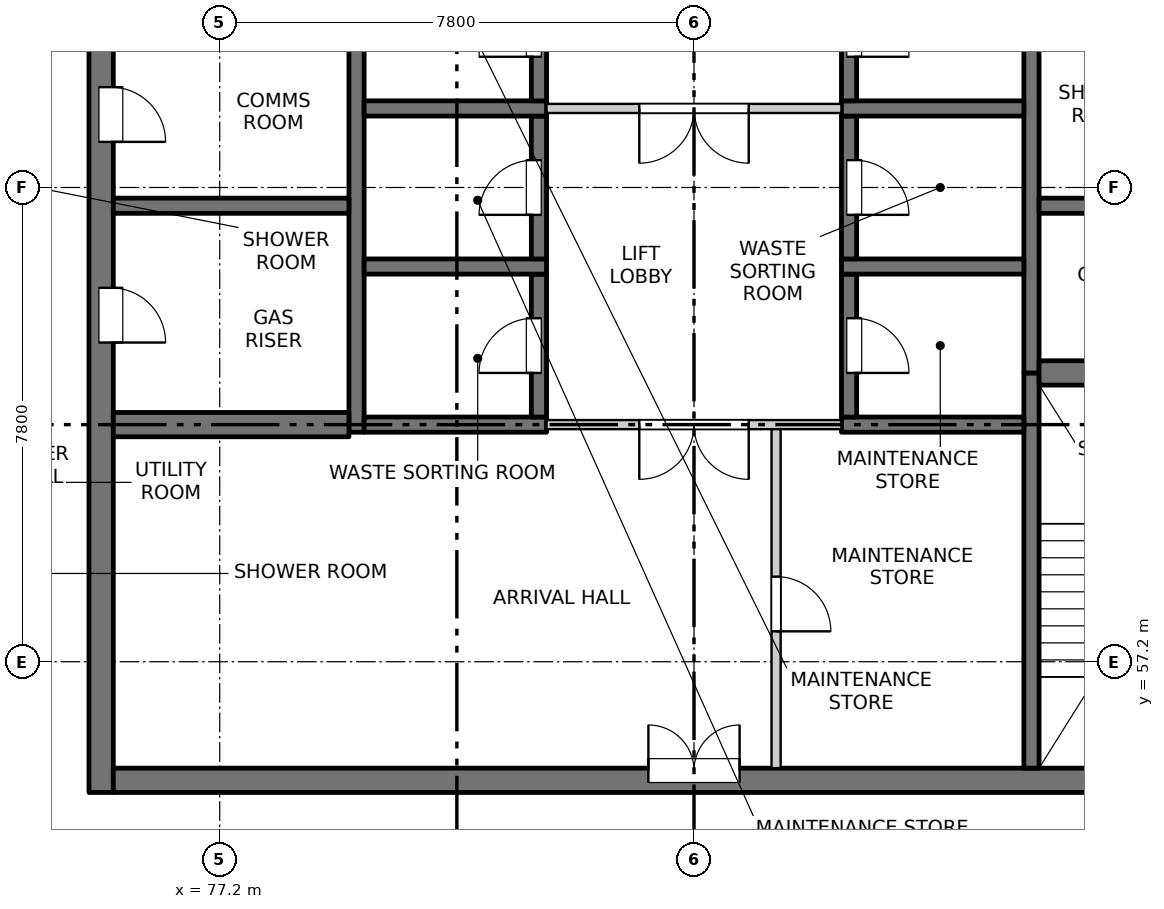
"""IFC4 building model, lengths in metres.
Left out: names, types, materials, properties, quantities, classifications, styles, units other than length and angle.
Written with IfcOpenShell. Run it as: python <this file> out.ifc"""

import sys

from ifc_helpers import new_model, si_unit, direction, frame, frame_2d, origin, place, context, subcontext, project, spatial, rectangle, extrude, element, fill, save


model = new_model("IFC4")
c1 = context("Model", 3, precision=1e-05, world=origin(), true_north=direction((0.0, 1.0)))
c2 = subcontext(c1, "Body", "Model", "MODEL_VIEW")
j1 = project(units=[si_unit("LENGTHUNIT", "METRE"), si_unit("PLANEANGLEUNIT", "RADIAN")], contexts=[c1])
p1 = place(None, origin())
s1 = spatial("IfcSite", under=j1, at=p1, CompositionType="ELEMENT")
p2 = place(p1, origin())
s2 = spatial("IfcBuilding", under=s1, at=p2, CompositionType="ELEMENT")
p3 = place(p2, frame((0.0, 0.0, 224.5)))
s3 = spatial("IfcBuildingStorey", under=s2, at=p3, CompositionType="ELEMENT", Elevation=224.5)
p4 = place(p3, frame((75.25, 55.05, -0.25), z_axis=(0.0, 0.0, 1.0), x_axis=(0.0, 1.0, 0.0)))
e1 = element("IfcWall", 1, at=p4, inside=s3, PredefinedType="SOLIDWALL", context=c2, shape_type="SweptSolid", body=[
    extrude(rectangle(XDim=22.25, YDim=0.4, at=frame_2d((11.125, 0.0))), origin(), (0.0, 0.0, 1.0), 3.4),
])
p5 = place(p4, frame((7.4, 0.0, 0.25)))
e2 = element("IfcOpeningElement", 2, at=p5, cuts=e1, PredefinedType="OPENING", context=c2, shape_type="SweptSolid", body=[
    extrude(rectangle(XDim=0.9, YDim=2.1, at=frame_2d((0.45, 1.05))), frame((0.0, 0.21, 0.0), z_axis=(0.0, -1.0, 0.0), x_axis=(1.0, 0.0, 0.0)), (0.0, 0.0, 1.0), 0.42),
])
p6 = place(p4, frame((10.7, 0.0, 0.25)))
e3 = element("IfcOpeningElement", 3, at=p6, cuts=e1, PredefinedType="OPENING", context=c2, shape_type="SweptSolid", body=[
    extrude(rectangle(XDim=0.9, YDim=2.1, at=frame_2d((0.45, 1.05))), frame((0.0, 0.21, 0.0), z_axis=(0.0, -1.0, 0.0), x_axis=(1.0, 0.0, 0.0)), (0.0, 0.0, 1.0), 0.42),
])
p7 = place(p4, frame((15.2, 0.0, 0.25)))
e4 = element("IfcOpeningElement", 4, at=p7, cuts=e1, PredefinedType="OPENING", context=c2, shape_type="SweptSolid", body=[
    extrude(rectangle(XDim=0.9, YDim=2.1, at=frame_2d((0.45, 1.05))), frame((0.0, 0.21, 0.0), z_axis=(0.0, -1.0, 0.0), x_axis=(1.0, 0.0, 0.0)), (0.0, 0.0, 1.0), 0.42),
])
p8 = place(p4, frame((20.0, 0.0, 0.25)))
e5 = element("IfcOpeningElement", 5, at=p8, cuts=e1, PredefinedType="OPENING", context=c2, shape_type="SweptSolid", body=[
    extrude(rectangle(XDim=0.9, YDim=2.1, at=frame_2d((0.45, 1.05))), frame((0.0, 0.21, 0.0), z_axis=(0.0, -1.0, 0.0), x_axis=(1.0, 0.0, 0.0)), (0.0, 0.0, 1.0), 0.42),
])
p9 = place(p3, frame((75.45, 55.25, -0.25), z_axis=(0.0, 0.0, 1.0), x_axis=(1.0, 0.0, 0.0)))
e6 = element("IfcWall", 6, at=p9, inside=s3, PredefinedType="SOLIDWALL", context=c2, shape_type="SweptSolid", body=[
    extrude(rectangle(XDim=19.1, YDim=0.4, at=frame_2d((9.55, 0.0))), origin(), (0.0, 0.0, 1.0), 3.4),
])
p10 = place(p9, frame((8.8, 0.0, 0.25)))
e7 = element("IfcOpeningElement", 7, at=p10, cuts=e6, PredefinedType="OPENING", context=c2, shape_type="SweptSolid", body=[
    extrude(rectangle(XDim=1.5, YDim=2.1, at=frame_2d((0.75, 1.05))), frame((0.0, 0.21, 0.0), z_axis=(0.0, -1.0, 0.0), x_axis=(1.0, 0.0, 0.0)), (0.0, 0.0, 1.0), 0.42),
])
p11 = place(p3, frame((79.45, 60.975, -0.25), z_axis=(0.0, 0.0, 1.0), x_axis=(0.0, 1.0, 0.0)))
e8 = element("IfcWall", 8, at=p11, inside=s3, PredefinedType="SOLIDWALL", context=c2, shape_type="SweptSolid", body=[
    extrude(rectangle(XDim=16.325, YDim=0.25, at=frame_2d((8.163, 0.0))), origin(), (0.0, 0.0, 1.0), 3.4),
])
p12 = place(p3, frame((90.55, 55.45, -0.25), z_axis=(0.0, 0.0, 1.0), x_axis=(0.0, 1.0, 0.0)))
e9 = element("IfcWall", 9, at=p12, inside=s3, PredefinedType="SOLIDWALL", context=c2, shape_type="SweptSolid", body=[
    extrude(rectangle(XDim=6.5, YDim=0.25, at=frame_2d((3.25, 0.0))), origin(), (0.0, 0.0, 1.0), 3.4),
])
p13 = place(p3, frame((90.55, 61.95, -0.25), z_axis=(0.0, 0.0, 1.0), x_axis=(0.0, 1.0, 0.0)))
e10 = element("IfcWall", 10, at=p13, inside=s3, PredefinedType="SOLIDWALL", context=c2, shape_type="SweptSolid", body=[
    extrude(rectangle(XDim=15.35, YDim=0.25, at=frame_2d((7.675, 0.0))), origin(), (0.0, 0.0, 1.0), 3.4),
])
p14 = place(p3, frame((79.575, 61.1, -0.25), z_axis=(0.0, 0.0, 1.0), x_axis=(1.0, 0.0, 0.0)))
e11 = element("IfcWall", 11, at=p14, inside=s3, PredefinedType="SOLIDWALL", context=c2, shape_type="SweptSolid", body=[
    extrude(rectangle(XDim=3.0, YDim=0.25, at=frame_2d((1.5, 0.0))), origin(), (0.0, 0.0, 1.0), 3.4),
])
p15 = place(p3, frame((82.45, 61.225, -0.25), z_axis=(0.0, 0.0, 1.0), x_axis=(0.0, 1.0, 0.0)))
e12 = element("IfcWall", 12, at=p15, inside=s3, PredefinedType="SOLIDWALL", context=c2, shape_type="SweptSolid", body=[
    extrude(rectangle(XDim=2.35, YDim=0.25, at=frame_2d((1.175, 0.0))), origin(), (0.0, 0.0, 1.0), 3.4),
])
p16 = place(p15, frame((0.725, 0.0, 0.25)))
e13 = element("IfcOpeningElement", 13, at=p16, cuts=e12, PredefinedType="OPENING", context=c2, shape_type="SweptSolid", body=[
    extrude(rectangle(XDim=0.9, YDim=2.1, at=frame_2d((0.45, 1.05))), frame((0.0, 0.135, 0.0), z_axis=(0.0, -1.0, 0.0), x_axis=(1.0, 0.0, 0.0)), (0.0, 0.0, 1.0), 0.27),
])
p17 = place(p3, frame((79.575, 63.7, -0.25), z_axis=(0.0, 0.0, 1.0), x_axis=(1.0, 0.0, 0.0)))
e14 = element("IfcWall", 14, at=p17, inside=s3, PredefinedType="SOLIDWALL", context=c2, shape_type="SweptSolid", body=[
    extrude(rectangle(XDim=3.0, YDim=0.25, at=frame_2d((1.5, 0.0))), origin(), (0.0, 0.0, 1.0), 3.4),
])
p18 = place(p3, frame((82.45, 63.825, -0.25), z_axis=(0.0, 0.0, 1.0), x_axis=(0.0, 1.0, 0.0)))
e15 = element("IfcWall", 15, at=p18, inside=s3, PredefinedType="SOLIDWALL", context=c2, shape_type="SweptSolid", body=[
    extrude(rectangle(XDim=2.35, YDim=0.25, at=frame_2d((1.175, 0.0))), origin(), (0.0, 0.0, 1.0), 3.4),
])
p19 = place(p18, frame((0.725, 0.0, 0.25)))
e16 = element("IfcOpeningElement", 16, at=p19, cuts=e15, PredefinedType="OPENING", context=c2, shape_type="SweptSolid", body=[
    extrude(rectangle(XDim=0.9, YDim=2.1, at=frame_2d((0.45, 1.05))), frame((0.0, 0.135, 0.0), z_axis=(0.0, -1.0, 0.0), x_axis=(1.0, 0.0, 0.0)), (0.0, 0.0, 1.0), 0.27),
])
p20 = place(p3, frame((79.575, 66.3, -0.25), z_axis=(0.0, 0.0, 1.0), x_axis=(1.0, 0.0, 0.0)))
e17 = element("IfcWall", 17, at=p20, inside=s3, PredefinedType="SOLIDWALL", context=c2, shape_type="SweptSolid", body=[
    extrude(rectangle(XDim=3.0, YDim=0.25, at=frame_2d((1.5, 0.0))), origin(), (0.0, 0.0, 1.0), 3.4),
])
p21 = place(p3, frame((82.45, 66.425, -0.25), z_axis=(0.0, 0.0, 1.0), x_axis=(0.0, 1.0, 0.0)))
e18 = element("IfcWall", 18, at=p21, inside=s3, PredefinedType="SOLIDWALL", context=c2, shape_type="SweptSolid", body=[
    extrude(rectangle(XDim=2.35, YDim=0.25, at=frame_2d((1.175, 0.0))), origin(), (0.0, 0.0, 1.0), 3.4),
])
p22 = place(p21, frame((0.725, 0.0, 0.25)))
e19 = element("IfcOpeningElement", 19, at=p22, cuts=e18, PredefinedType="OPENING", context=c2, shape_type="SweptSolid", body=[
    extrude(rectangle(XDim=0.9, YDim=2.1, at=frame_2d((0.45, 1.05))), frame((0.0, 0.135, 0.0), z_axis=(0.0, -1.0, 0.0), x_axis=(1.0, 0.0, 0.0)), (0.0, 0.0, 1.0), 0.27),
])
p23 = place(p3, frame((87.425, 61.1, -0.25), z_axis=(0.0, 0.0, 1.0), x_axis=(1.0, 0.0, 0.0)))
e20 = element("IfcWall", 20, at=p23, inside=s3, PredefinedType="SOLIDWALL", context=c2, shape_type="SweptSolid", body=[
    extrude(rectangle(XDim=3.0, YDim=0.25, at=frame_2d((1.5, 0.0))), origin(), (0.0, 0.0, 1.0), 3.4),
])
p24 = place(p3, frame((87.55, 61.225, -0.25), z_axis=(0.0, 0.0, 1.0), x_axis=(0.0, 1.0, 0.0)))
e21 = element("IfcWall", 21, at=p24, inside=s3, PredefinedType="SOLIDWALL", context=c2, shape_type="SweptSolid", body=[
    extrude(rectangle(XDim=2.35, YDim=0.25, at=frame_2d((1.175, 0.0))), origin(), (0.0, 0.0, 1.0), 3.4),
])
p25 = place(p24, frame((0.725, 0.0, 0.25)))
e22 = element("IfcOpeningElement", 22, at=p25, cuts=e21, PredefinedType="OPENING", context=c2, shape_type="SweptSolid", body=[
    extrude(rectangle(XDim=0.9, YDim=2.1, at=frame_2d((0.45, 1.05))), frame((0.0, 0.135, 0.0), z_axis=(0.0, -1.0, 0.0), x_axis=(1.0, 0.0, 0.0)), (0.0, 0.0, 1.0), 0.27),
])
p26 = place(p3, frame((87.425, 63.7, -0.25), z_axis=(0.0, 0.0, 1.0), x_axis=(1.0, 0.0, 0.0)))
e23 = element("IfcWall", 23, at=p26, inside=s3, PredefinedType="SOLIDWALL", context=c2, shape_type="SweptSolid", body=[
    extrude(rectangle(XDim=3.0, YDim=0.25, at=frame_2d((1.5, 0.0))), origin(), (0.0, 0.0, 1.0), 3.4),
])
p27 = place(p3, frame((87.55, 63.825, -0.25), z_axis=(0.0, 0.0, 1.0), x_axis=(0.0, 1.0, 0.0)))
e24 = element("IfcWall", 24, at=p27, inside=s3, PredefinedType="SOLIDWALL", context=c2, shape_type="SweptSolid", body=[
    extrude(rectangle(XDim=2.35, YDim=0.25, at=frame_2d((1.175, 0.0))), origin(), (0.0, 0.0, 1.0), 3.4),
])
p28 = place(p27, frame((0.725, 0.0, 0.25)))
e25 = element("IfcOpeningElement", 25, at=p28, cuts=e24, PredefinedType="OPENING", context=c2, shape_type="SweptSolid", body=[
    extrude(rectangle(XDim=0.9, YDim=2.1, at=frame_2d((0.45, 1.05))), frame((0.0, 0.135, 0.0), z_axis=(0.0, -1.0, 0.0), x_axis=(1.0, 0.0, 0.0)), (0.0, 0.0, 1.0), 0.27),
])
p29 = place(p3, frame((87.425, 66.3, -0.25), z_axis=(0.0, 0.0, 1.0), x_axis=(1.0, 0.0, 0.0)))
e26 = element("IfcWall", 26, at=p29, inside=s3, PredefinedType="SOLIDWALL", context=c2, shape_type="SweptSolid", body=[
    extrude(rectangle(XDim=3.0, YDim=0.25, at=frame_2d((1.5, 0.0))), origin(), (0.0, 0.0, 1.0), 3.4),
])
p30 = place(p3, frame((87.55, 66.425, -0.25), z_axis=(0.0, 0.0, 1.0), x_axis=(0.0, 1.0, 0.0)))
e27 = element("IfcWall", 27, at=p30, inside=s3, PredefinedType="SOLIDWALL", context=c2, shape_type="SweptSolid", body=[
    extrude(rectangle(XDim=2.35, YDim=0.25, at=frame_2d((1.175, 0.0))), origin(), (0.0, 0.0, 1.0), 3.4),
])
p31 = place(p30, frame((0.725, 0.0, 0.25)))
e28 = element("IfcOpeningElement", 28, at=p31, cuts=e27, PredefinedType="OPENING", context=c2, shape_type="SweptSolid", body=[
    extrude(rectangle(XDim=0.9, YDim=2.1, at=frame_2d((0.45, 1.05))), frame((0.0, 0.135, 0.0), z_axis=(0.0, -1.0, 0.0), x_axis=(1.0, 0.0, 0.0)), (0.0, 0.0, 1.0), 0.27),
])
p32 = place(p3, frame((75.45, 61.1, -0.25), z_axis=(0.0, 0.0, 1.0), x_axis=(1.0, 0.0, 0.0)))
e29 = element("IfcWall", 29, at=p32, inside=s3, PredefinedType="SOLIDWALL", context=c2, shape_type="SweptSolid", body=[
    extrude(rectangle(XDim=3.875, YDim=0.4, at=frame_2d((1.938, 0.0))), origin(), (0.0, 0.0, 1.0), 3.4),
])
p33 = place(p3, frame((75.45, 64.7, -0.25), z_axis=(0.0, 0.0, 1.0), x_axis=(1.0, 0.0, 0.0)))
e30 = element("IfcWall", 30, at=p33, inside=s3, PredefinedType="SOLIDWALL", context=c2, shape_type="SweptSolid", body=[
    extrude(rectangle(XDim=3.875, YDim=0.25, at=frame_2d((1.938, 0.0))), origin(), (0.0, 0.0, 1.0), 3.4),
])
p34 = place(p3, frame((90.675, 61.95, -0.25), z_axis=(0.0, 0.0, 1.0), x_axis=(1.0, 0.0, 0.0)))
e31 = element("IfcWall", 31, at=p34, inside=s3, PredefinedType="SOLIDWALL", context=c2, shape_type="SweptSolid", body=[
    extrude(rectangle(XDim=3.875, YDim=0.4, at=frame_2d((1.938, 0.0))), origin(), (0.0, 0.0, 1.0), 3.4),
])
p35 = place(p3, frame((90.675, 64.7, -0.25), z_axis=(0.0, 0.0, 1.0), x_axis=(1.0, 0.0, 0.0)))
e32 = element("IfcWall", 32, at=p35, inside=s3, PredefinedType="SOLIDWALL", context=c2, shape_type="SweptSolid", body=[
    extrude(rectangle(XDim=3.875, YDim=0.25, at=frame_2d((1.938, 0.0))), origin(), (0.0, 0.0, 1.0), 3.4),
])
p36 = place(p3, frame((82.575, 61.1, 0.0), z_axis=(0.0, 0.0, 1.0), x_axis=(1.0, 0.0, 0.0)))
e33 = element("IfcWall", 33, at=p36, inside=s3, PredefinedType="PARTITIONING", context=c2, shape_type="SweptSolid", body=[
    extrude(rectangle(XDim=4.85, YDim=0.15, at=frame_2d((2.425, 0.0))), origin(), (0.0, 0.0, 1.0), 3.15),
])
p37 = place(p36, frame((1.525, 0.0, 0.0)))
e34 = element("IfcOpeningElement", 34, at=p37, cuts=e33, PredefinedType="OPENING", context=c2, shape_type="SweptSolid", body=[
    extrude(rectangle(XDim=1.8, YDim=2.1, at=frame_2d((0.9, 1.05))), frame((0.0, 0.085, 0.0), z_axis=(0.0, -1.0, 0.0), x_axis=(1.0, 0.0, 0.0)), (0.0, 0.0, 1.0), 0.17),
])
p38 = place(p3, frame((82.575, 66.3, 0.0), z_axis=(0.0, 0.0, 1.0), x_axis=(1.0, 0.0, 0.0)))
e35 = element("IfcWall", 35, at=p38, inside=s3, PredefinedType="PARTITIONING", context=c2, shape_type="SweptSolid", body=[
    extrude(rectangle(XDim=4.85, YDim=0.15, at=frame_2d((2.425, 0.0))), origin(), (0.0, 0.0, 1.0), 3.15),
])
p39 = place(p38, frame((1.525, 0.0, 0.0)))
e36 = element("IfcOpeningElement", 36, at=p39, cuts=e35, PredefinedType="OPENING", context=c2, shape_type="SweptSolid", body=[
    extrude(rectangle(XDim=1.8, YDim=2.1, at=frame_2d((0.9, 1.05))), frame((0.0, 0.085, 0.0), z_axis=(0.0, -1.0, 0.0), x_axis=(1.0, 0.0, 0.0)), (0.0, 0.0, 1.0), 0.17),
])
p40 = place(p3, frame((86.35, 55.45, 0.0), z_axis=(0.0, 0.0, 1.0), x_axis=(0.0, 1.0, 0.0)))
e37 = element("IfcWall", 37, at=p40, inside=s3, PredefinedType="PARTITIONING", context=c2, shape_type="SweptSolid", body=[
    extrude(rectangle(XDim=5.575, YDim=0.15, at=frame_2d((2.788, 0.0))), origin(), (0.0, 0.0, 1.0), 3.15),
])
p41 = place(p40, frame((2.25, 0.0, 0.0)))
e38 = element("IfcOpeningElement", 38, at=p41, cuts=e37, PredefinedType="OPENING", context=c2, shape_type="SweptSolid", body=[
    extrude(rectangle(XDim=0.9, YDim=2.1, at=frame_2d((0.45, 1.05))), frame((0.0, 0.085, 0.0), z_axis=(0.0, -1.0, 0.0), x_axis=(1.0, 0.0, 0.0)), (0.0, 0.0, 1.0), 0.17),
])
p42 = place(p10, origin())
e39 = element("IfcDoor", 39, at=p42, inside=s3, OperationType="DOUBLE_DOOR_SINGLE_SWING", PredefinedType="DOOR", context=c2, shape_type="SweptSolid", body=[
    extrude(rectangle(XDim=1.5, YDim=2.1, at=frame_2d((0.75, 1.05))), frame((0.0, 0.185, 0.0), z_axis=(0.0, -1.0, 0.0), x_axis=(1.0, 0.0, 0.0)), (0.0, 0.0, 1.0), 0.05),
])
fill(e7, e39)
p43 = place(p41, origin())
e40 = element("IfcDoor", 40, at=p43, inside=s3, OperationType="SINGLE_SWING_RIGHT", PredefinedType="DOOR", context=c2, shape_type="SweptSolid", body=[
    extrude(rectangle(XDim=0.9, YDim=2.1, at=frame_2d((0.45, 1.05))), frame((0.0, 0.025, 0.0), z_axis=(0.0, -1.0, 0.0), x_axis=(1.0, 0.0, 0.0)), (0.0, 0.0, 1.0), 0.05),
])
fill(e38, e40)
p44 = place(p37, origin())
e41 = element("IfcDoor", 41, at=p44, inside=s3, OperationType="DOUBLE_DOOR_SINGLE_SWING", PredefinedType="DOOR", context=c2, shape_type="SweptSolid", body=[
    extrude(rectangle(XDim=1.8, YDim=2.1, at=frame_2d((0.9, 1.05))), frame((0.0, 0.025, 0.0), z_axis=(0.0, -1.0, 0.0), x_axis=(1.0, 0.0, 0.0)), (0.0, 0.0, 1.0), 0.05),
])
fill(e34, e41)
p45 = place(p16, origin())
e42 = element("IfcDoor", 42, at=p45, inside=s3, OperationType="SINGLE_SWING_LEFT", PredefinedType="DOOR", context=c2, shape_type="SweptSolid", body=[
    extrude(rectangle(XDim=0.9, YDim=2.1, at=frame_2d((0.45, 1.05))), frame((0.0, 0.11, 0.0), z_axis=(0.0, -1.0, 0.0), x_axis=(1.0, 0.0, 0.0)), (0.0, 0.0, 1.0), 0.05),
])
fill(e13, e42)
p46 = place(p25, origin())
e43 = element("IfcDoor", 43, at=p46, inside=s3, OperationType="SINGLE_SWING_RIGHT", PredefinedType="DOOR", context=c2, shape_type="SweptSolid", body=[
    extrude(rectangle(XDim=0.9, YDim=2.1, at=frame_2d((0.45, 1.05))), frame((0.0, -0.06, 0.0), z_axis=(0.0, -1.0, 0.0), x_axis=(1.0, 0.0, 0.0)), (0.0, 0.0, 1.0), 0.05),
])
fill(e22, e43)
p47 = place(p5, origin())
e44 = element("IfcDoor", 44, at=p47, inside=s3, OperationType="SINGLE_SWING_RIGHT", PredefinedType="DOOR", context=c2, shape_type="SweptSolid", body=[
    extrude(rectangle(XDim=0.9, YDim=2.1, at=frame_2d((0.45, 1.05))), frame((0.0, -0.135, 0.0), z_axis=(0.0, -1.0, 0.0), x_axis=(1.0, 0.0, 0.0)), (0.0, 0.0, 1.0), 0.05),
])
fill(e2, e44)
p48 = place(p19, origin())
e45 = element("IfcDoor", 45, at=p48, inside=s3, OperationType="SINGLE_SWING_LEFT", PredefinedType="DOOR", context=c2, shape_type="SweptSolid", body=[
    extrude(rectangle(XDim=0.9, YDim=2.1, at=frame_2d((0.45, 1.05))), frame((0.0, 0.11, 0.0), z_axis=(0.0, -1.0, 0.0), x_axis=(1.0, 0.0, 0.0)), (0.0, 0.0, 1.0), 0.05),
])
fill(e16, e45)
p49 = place(p28, origin())
e46 = element("IfcDoor", 46, at=p49, inside=s3, OperationType="SINGLE_SWING_RIGHT", PredefinedType="DOOR", context=c2, shape_type="SweptSolid", body=[
    extrude(rectangle(XDim=0.9, YDim=2.1, at=frame_2d((0.45, 1.05))), frame((0.0, -0.06, 0.0), z_axis=(0.0, -1.0, 0.0), x_axis=(1.0, 0.0, 0.0)), (0.0, 0.0, 1.0), 0.05),
])
fill(e25, e46)
p50 = place(p6, origin())
e47 = element("IfcDoor", 47, at=p50, inside=s3, OperationType="SINGLE_SWING_RIGHT", PredefinedType="DOOR", context=c2, shape_type="SweptSolid", body=[
    extrude(rectangle(XDim=0.9, YDim=2.1, at=frame_2d((0.45, 1.05))), frame((0.0, -0.135, 0.0), z_axis=(0.0, -1.0, 0.0), x_axis=(1.0, 0.0, 0.0)), (0.0, 0.0, 1.0), 0.05),
])
fill(e3, e47)
p51 = place(p39, origin())
e48 = element("IfcDoor", 48, at=p51, inside=s3, OperationType="DOUBLE_DOOR_SINGLE_SWING", PredefinedType="DOOR", context=c2, shape_type="SweptSolid", body=[
    extrude(rectangle(XDim=1.8, YDim=2.1, at=frame_2d((0.9, 1.05))), frame((0.0, 0.025, 0.0), z_axis=(0.0, -1.0, 0.0), x_axis=(1.0, 0.0, 0.0)), (0.0, 0.0, 1.0), 0.05),
])
fill(e36, e48)
p52 = place(p22, origin())
e49 = element("IfcDoor", 49, at=p52, inside=s3, OperationType="SINGLE_SWING_LEFT", PredefinedType="DOOR", context=c2, shape_type="SweptSolid", body=[
    extrude(rectangle(XDim=0.9, YDim=2.1, at=frame_2d((0.45, 1.05))), frame((0.0, 0.11, 0.0), z_axis=(0.0, -1.0, 0.0), x_axis=(1.0, 0.0, 0.0)), (0.0, 0.0, 1.0), 0.05),
])
fill(e19, e49)
p53 = place(p31, origin())
e50 = element("IfcDoor", 50, at=p53, inside=s3, OperationType="SINGLE_SWING_RIGHT", PredefinedType="DOOR", context=c2, shape_type="SweptSolid", body=[
    extrude(rectangle(XDim=0.9, YDim=2.1, at=frame_2d((0.45, 1.05))), frame((0.0, -0.06, 0.0), z_axis=(0.0, -1.0, 0.0), x_axis=(1.0, 0.0, 0.0)), (0.0, 0.0, 1.0), 0.05),
])
fill(e28, e50)
save(model, sys.argv[1])
